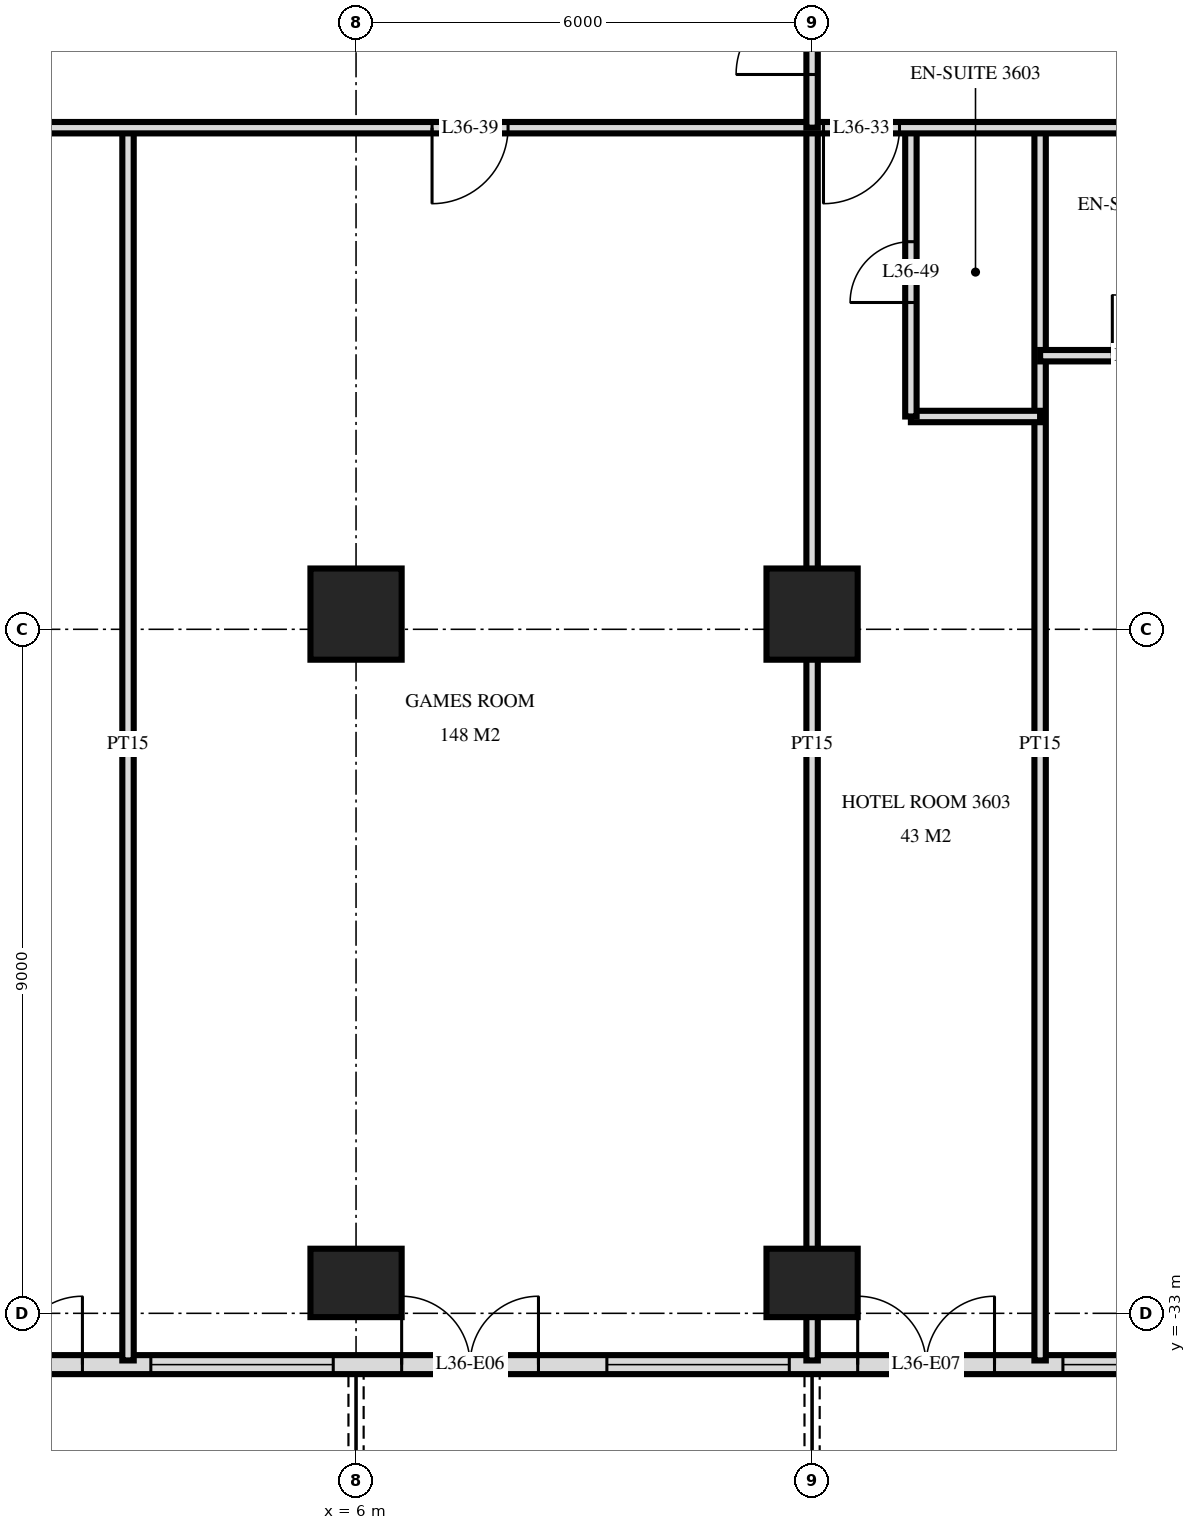
"""IFC4 building model, lengths in metres.
Left out: names, types, materials, properties, quantities, classifications, styles, units other than length and angle.
Written with IfcOpenShell. Run it as: python <this file> out.ifc"""

import sys

from ifc_helpers import new_model, si_unit, direction, frame, frame_2d, origin, origin_2d, place, context, subcontext, project, spatial, rectangle, extrude, element, fill, save


model = new_model("IFC4")
c1 = context("Model", 3, precision=1e-05, world=origin(), true_north=direction((0.0, 1.0)))
c2 = subcontext(c1, "Body", "Model", "MODEL_VIEW")
j1 = project(units=[si_unit("LENGTHUNIT", "METRE"), si_unit("PLANEANGLEUNIT", "RADIAN")], contexts=[c1])
p1 = place(None, origin())
s1 = spatial("IfcSite", under=j1, at=p1, CompositionType="ELEMENT")
p2 = place(p1, origin())
s2 = spatial("IfcBuilding", under=s1, at=p2, CompositionType="ELEMENT")
p3 = place(p2, frame((0.0, 0.0, 141.6)))
s3 = spatial("IfcBuildingStorey", under=s2, at=p3, CompositionType="ELEMENT", Elevation=141.6)
p4 = place(p3, frame((6.0, -32.6, 0.0), z_axis=(0.0, 0.0, 1.0), x_axis=(1.0, 0.0, 0.0)))
e1 = element("IfcColumn", 1, at=p4, inside=s3, PredefinedType="COLUMN", context=c2, shape_type="SweptSolid", body=[
    extrude(rectangle(XDim=1.2, YDim=0.9, at=origin_2d()), origin(), (0.0, 0.0, 1.0), 3.6),
])
p5 = place(p3, frame((6.0, -23.8, 0.0), z_axis=(0.0, 0.0, 1.0), x_axis=(1.0, 0.0, 0.0)))
e2 = element("IfcColumn", 2, at=p5, inside=s3, PredefinedType="COLUMN", context=c2, shape_type="SweptSolid", body=[
    extrude(rectangle(XDim=1.2, YDim=1.2, at=origin_2d()), origin(), (0.0, 0.0, 1.0), 3.6),
])
p6 = place(p3, frame((12.0, -32.6, 0.0), z_axis=(0.0, 0.0, 1.0), x_axis=(1.0, 0.0, 0.0)))
e3 = element("IfcColumn", 3, at=p6, inside=s3, PredefinedType="COLUMN", context=c2, shape_type="SweptSolid", body=[
    extrude(rectangle(XDim=1.2, YDim=0.9, at=origin_2d()), origin(), (0.0, 0.0, 1.0), 3.6),
])
p7 = place(p3, frame((12.0, -23.8, 0.0), z_axis=(0.0, 0.0, 1.0), x_axis=(1.0, 0.0, 0.0)))
e4 = element("IfcColumn", 4, at=p7, inside=s3, PredefinedType="COLUMN", context=c2, shape_type="SweptSolid", body=[
    extrude(rectangle(XDim=1.2, YDim=1.2, at=origin_2d()), origin(), (0.0, 0.0, 1.0), 3.6),
])
p8 = place(p3, frame((-23.675, -33.675, 0.0), z_axis=(0.0, 0.0, 1.0), x_axis=(1.0, 0.0, 0.0)))
e5 = element("IfcWall", 5, at=p8, inside=s3, PredefinedType="SOLIDWALL", context=c2, shape_type="SweptSolid", body=[
    extrude(rectangle(XDim=47.351, YDim=0.25, at=frame_2d((23.675, 0.0))), origin(), (0.0, 0.0, 1.0), 3.32),
])
p9 = place(p8, frame((0.575, 0.0, 0.0)))
e6 = element("IfcOpeningElement", 6, at=p9, cuts=e5, PredefinedType="OPENING", context=c2, shape_type="SweptSolid", body=[
    extrude(rectangle(XDim=1.8, YDim=2.4, at=frame_2d((0.9, 1.2))), frame((0.0, 0.135, 0.0), z_axis=(0.0, -1.0, 0.0), x_axis=(1.0, 0.0, 0.0)), (0.0, 0.0, 1.0), 0.27),
])
p10 = place(p8, frame((3.425, 0.0, 0.3)))
e7 = element("IfcOpeningElement", 7, at=p10, cuts=e5, PredefinedType="OPENING", context=c2, shape_type="SweptSolid", body=[
    extrude(rectangle(XDim=1.8, YDim=2.1, at=frame_2d((0.9, 1.05))), frame((0.0, 0.135, 0.0), z_axis=(0.0, -1.0, 0.0), x_axis=(1.0, 0.0, 0.0)), (0.0, 0.0, 1.0), 0.27),
])
p11 = place(p8, frame((5.975, 0.0, 0.3)))
e8 = element("IfcOpeningElement", 8, at=p11, cuts=e5, PredefinedType="OPENING", context=c2, shape_type="SweptSolid", body=[
    extrude(rectangle(XDim=2.4, YDim=2.1, at=frame_2d((1.2, 1.05))), frame((0.0, 0.135, 0.0), z_axis=(0.0, -1.0, 0.0), x_axis=(1.0, 0.0, 0.0)), (0.0, 0.0, 1.0), 0.27),
])
p12 = place(p8, frame((9.275, 0.0, 0.0)))
e9 = element("IfcOpeningElement", 9, at=p12, cuts=e5, PredefinedType="OPENING", context=c2, shape_type="SweptSolid", body=[
    extrude(rectangle(XDim=1.8, YDim=2.4, at=frame_2d((0.9, 1.2))), frame((0.0, 0.135, 0.0), z_axis=(0.0, -1.0, 0.0), x_axis=(1.0, 0.0, 0.0)), (0.0, 0.0, 1.0), 0.27),
])
p13 = place(p8, frame((12.275, 0.0, 0.0)))
e10 = element("IfcOpeningElement", 10, at=p13, cuts=e5, PredefinedType="OPENING", context=c2, shape_type="SweptSolid", body=[
    extrude(rectangle(XDim=1.8, YDim=2.4, at=frame_2d((0.9, 1.2))), frame((0.0, 0.135, 0.0), z_axis=(0.0, -1.0, 0.0), x_axis=(1.0, 0.0, 0.0)), (0.0, 0.0, 1.0), 0.27),
])
p14 = place(p8, frame((14.975, 0.0, 0.3)))
e11 = element("IfcOpeningElement", 11, at=p14, cuts=e5, PredefinedType="OPENING", context=c2, shape_type="SweptSolid", body=[
    extrude(rectangle(XDim=2.4, YDim=2.1, at=frame_2d((1.2, 1.05))), frame((0.0, 0.135, 0.0), z_axis=(0.0, -1.0, 0.0), x_axis=(1.0, 0.0, 0.0)), (0.0, 0.0, 1.0), 0.27),
])
p15 = place(p8, frame((17.975, 0.0, 0.3)))
e12 = element("IfcOpeningElement", 12, at=p15, cuts=e5, PredefinedType="OPENING", context=c2, shape_type="SweptSolid", body=[
    extrude(rectangle(XDim=2.4, YDim=2.1, at=frame_2d((1.2, 1.05))), frame((0.0, 0.135, 0.0), z_axis=(0.0, -1.0, 0.0), x_axis=(1.0, 0.0, 0.0)), (0.0, 0.0, 1.0), 0.27),
])
p16 = place(p8, frame((21.275, 0.0, 0.0)))
e13 = element("IfcOpeningElement", 13, at=p16, cuts=e5, PredefinedType="OPENING", context=c2, shape_type="SweptSolid", body=[
    extrude(rectangle(XDim=1.8, YDim=2.4, at=frame_2d((0.9, 1.2))), frame((0.0, 0.135, 0.0), z_axis=(0.0, -1.0, 0.0), x_axis=(1.0, 0.0, 0.0)), (0.0, 0.0, 1.0), 0.27),
])
p17 = place(p8, frame((24.275, 0.0, 0.0)))
e14 = element("IfcOpeningElement", 14, at=p17, cuts=e5, PredefinedType="OPENING", context=c2, shape_type="SweptSolid", body=[
    extrude(rectangle(XDim=1.8, YDim=2.4, at=frame_2d((0.9, 1.2))), frame((0.0, 0.135, 0.0), z_axis=(0.0, -1.0, 0.0), x_axis=(1.0, 0.0, 0.0)), (0.0, 0.0, 1.0), 0.27),
])
p18 = place(p8, frame((26.975, 0.0, 0.3)))
e15 = element("IfcOpeningElement", 15, at=p18, cuts=e5, PredefinedType="OPENING", context=c2, shape_type="SweptSolid", body=[
    extrude(rectangle(XDim=2.4, YDim=2.1, at=frame_2d((1.2, 1.05))), frame((0.0, 0.135, 0.0), z_axis=(0.0, -1.0, 0.0), x_axis=(1.0, 0.0, 0.0)), (0.0, 0.0, 1.0), 0.27),
])
p19 = place(p8, frame((30.275, 0.0, 0.0)))
e16 = element("IfcOpeningElement", 16, at=p19, cuts=e5, PredefinedType="OPENING", context=c2, shape_type="SweptSolid", body=[
    extrude(rectangle(XDim=1.8, YDim=2.4, at=frame_2d((0.9, 1.2))), frame((0.0, 0.135, 0.0), z_axis=(0.0, -1.0, 0.0), x_axis=(1.0, 0.0, 0.0)), (0.0, 0.0, 1.0), 0.27),
])
p20 = place(p8, frame((32.975, 0.0, 0.3)))
e17 = element("IfcOpeningElement", 17, at=p20, cuts=e5, PredefinedType="OPENING", context=c2, shape_type="SweptSolid", body=[
    extrude(rectangle(XDim=2.4, YDim=2.1, at=frame_2d((1.2, 1.05))), frame((0.0, 0.135, 0.0), z_axis=(0.0, -1.0, 0.0), x_axis=(1.0, 0.0, 0.0)), (0.0, 0.0, 1.0), 0.27),
])
p21 = place(p8, frame((36.275, 0.0, 0.0)))
e18 = element("IfcOpeningElement", 18, at=p21, cuts=e5, PredefinedType="OPENING", context=c2, shape_type="SweptSolid", body=[
    extrude(rectangle(XDim=1.8, YDim=2.4, at=frame_2d((0.9, 1.2))), frame((0.0, 0.135, 0.0), z_axis=(0.0, -1.0, 0.0), x_axis=(1.0, 0.0, 0.0)), (0.0, 0.0, 1.0), 0.27),
])
p22 = place(p8, frame((38.975, 0.0, 0.3)))
e19 = element("IfcOpeningElement", 19, at=p22, cuts=e5, PredefinedType="OPENING", context=c2, shape_type="SweptSolid", body=[
    extrude(rectangle(XDim=2.4, YDim=2.1, at=frame_2d((1.2, 1.05))), frame((0.0, 0.135, 0.0), z_axis=(0.0, -1.0, 0.0), x_axis=(1.0, 0.0, 0.0)), (0.0, 0.0, 1.0), 0.27),
])
p23 = place(p8, frame((42.275, 0.0, 0.0)))
e20 = element("IfcOpeningElement", 20, at=p23, cuts=e5, PredefinedType="OPENING", context=c2, shape_type="SweptSolid", body=[
    extrude(rectangle(XDim=1.8, YDim=2.4, at=frame_2d((0.9, 1.2))), frame((0.0, 0.135, 0.0), z_axis=(0.0, -1.0, 0.0), x_axis=(1.0, 0.0, 0.0)), (0.0, 0.0, 1.0), 0.27),
])
p24 = place(p8, frame((45.125, 0.0, 0.3)))
e21 = element("IfcOpeningElement", 21, at=p24, cuts=e5, PredefinedType="OPENING", context=c2, shape_type="SweptSolid", body=[
    extrude(rectangle(XDim=1.8, YDim=2.1, at=frame_2d((0.9, 1.05))), frame((0.0, 0.135, 0.0), z_axis=(0.0, -1.0, 0.0), x_axis=(1.0, 0.0, 0.0)), (0.0, 0.0, 1.0), 0.27),
])
p25 = place(p3, frame((15.0, -33.62, 0.0), z_axis=(0.0, 0.0, 1.0), x_axis=(0.0, 1.0, 0.0)))
e22 = element("IfcWall", 22, at=p25, inside=s3, PredefinedType="PARTITIONING", context=c2, shape_type="SweptSolid", body=[
    extrude(rectangle(XDim=16.22, YDim=0.15, at=frame_2d((8.11, 0.0))), origin(), (0.0, 0.0, 1.0), 3.32),
])
p26 = place(p3, frame((13.3, -21.2, 0.0), z_axis=(0.0, 0.0, 1.0), x_axis=(0.0, 1.0, 0.0)))
e23 = element("IfcWall", 23, at=p26, inside=s3, PredefinedType="PARTITIONING", context=c2, shape_type="SweptSolid", body=[
    extrude(rectangle(XDim=3.8, YDim=0.15, at=frame_2d((1.9, 0.0))), origin(), (0.0, 0.0, 1.0), 3.32),
])
p27 = place(p26, frame((1.5, 0.0, 0.0)))
e24 = element("IfcOpeningElement", 24, at=p27, cuts=e23, PredefinedType="OPENING", context=c2, shape_type="SweptSolid", body=[
    extrude(rectangle(XDim=0.8, YDim=2.1, at=frame_2d((0.4, 1.05))), frame((0.0, 0.085, 0.0), z_axis=(0.0, -1.0, 0.0), x_axis=(1.0, 0.0, 0.0)), (0.0, 0.0, 1.0), 0.17),
])
p28 = place(p3, frame((12.0, -17.4, 0.0), z_axis=(0.0, 0.0, 1.0), x_axis=(0.0, 1.0, 0.0)))
e25 = element("IfcWall", 25, at=p28, inside=s3, PredefinedType="PARTITIONING", context=c2, shape_type="SweptSolid", body=[
    extrude(rectangle(XDim=2.35, YDim=0.15, at=frame_2d((1.175, 0.0))), origin(), (0.0, 0.0, 1.0), 3.32),
])
p29 = place(p28, frame((0.7, 0.0, 0.0)))
e26 = element("IfcOpeningElement", 26, at=p29, cuts=e25, PredefinedType="OPENING", context=c2, shape_type="SweptSolid", body=[
    extrude(rectangle(XDim=1.0, YDim=2.1, at=frame_2d((0.5, 1.05))), frame((0.0, 0.085, 0.0), z_axis=(0.0, -1.0, 0.0), x_axis=(1.0, 0.0, 0.0)), (0.0, 0.0, 1.0), 0.17),
])
for number, where, z_axis, x_axis in (
    (27, (12.0, -33.62, 0.0), (0.0, 0.0, 1.0), (0.0, 1.0, 0.0)),
    (28, (3.0, -33.62, 0.0), (0.0, 0.0, 1.0), (0.0, 1.0, 0.0)),
):
    element("IfcWall", number, at=place(p3, frame(where, z_axis=z_axis, x_axis=x_axis)), inside=s3, PredefinedType="PARTITIONING", context=c2, shape_type="SweptSolid", body=[
        extrude(rectangle(XDim=16.22, YDim=0.15, at=frame_2d((8.11, 0.0))), origin(), (0.0, 0.0, 1.0), 3.32),
    ])
p30 = place(p3, frame((13.3, -21.2, 0.0), z_axis=(0.0, 0.0, 1.0), x_axis=(1.0, 0.0, 0.0)))
e29 = element("IfcWall", 29, at=p30, inside=s3, PredefinedType="PARTITIONING", context=c2, shape_type="SweptSolid", body=[
    extrude(rectangle(XDim=1.7, YDim=0.15, at=frame_2d((0.85, 0.0))), origin(), (0.0, 0.0, 1.0), 3.32),
])
p31 = place(p3, frame((15.0, -20.4, 0.0), z_axis=(0.0, 0.0, 1.0), x_axis=(1.0, 0.0, 0.0)))
e30 = element("IfcWall", 30, at=p31, inside=s3, PredefinedType="PARTITIONING", context=c2, shape_type="SweptSolid", body=[
    extrude(rectangle(XDim=4.2, YDim=0.15, at=frame_2d((2.1, 0.0))), origin(), (0.0, 0.0, 1.0), 3.32),
])
p32 = place(p31, frame((0.95, 0.0, 0.0)))
e31 = element("IfcOpeningElement", 31, at=p32, cuts=e30, PredefinedType="OPENING", context=c2, shape_type="SweptSolid", body=[
    extrude(rectangle(XDim=0.8, YDim=2.1, at=frame_2d((0.4, 1.05))), frame((0.0, 0.085, 0.0), z_axis=(0.0, -1.0, 0.0), x_axis=(1.0, 0.0, 0.0)), (0.0, 0.0, 1.0), 0.17),
])
p33 = place(p3, frame((-28.02, -17.4, 0.0), z_axis=(0.0, 0.0, 1.0), x_axis=(1.0, 0.0, 0.0)))
e32 = element("IfcWall", 32, at=p33, inside=s3, PredefinedType="PARTITIONING", context=c2, shape_type="SweptSolid", body=[
    extrude(rectangle(XDim=56.04, YDim=0.15, at=frame_2d((28.02, 0.0))), origin(), (0.0, 0.0, 1.0), 3.32),
])
p34 = place(p33, frame((13.17, 0.0, 0.0)))
e33 = element("IfcOpeningElement", 33, at=p34, cuts=e32, PredefinedType="OPENING", context=c2, shape_type="SweptSolid", body=[
    extrude(rectangle(XDim=1.0, YDim=2.1, at=frame_2d((0.5, 1.05))), frame((0.0, 0.085, 0.0), z_axis=(0.0, -1.0, 0.0), x_axis=(1.0, 0.0, 0.0)), (0.0, 0.0, 1.0), 0.17),
])
p35 = place(p33, frame((11.87, 0.0, 0.0)))
e34 = element("IfcOpeningElement", 34, at=p35, cuts=e32, PredefinedType="OPENING", context=c2, shape_type="SweptSolid", body=[
    extrude(rectangle(XDim=1.0, YDim=2.1, at=frame_2d((0.5, 1.05))), frame((0.0, 0.085, 0.0), z_axis=(0.0, -1.0, 0.0), x_axis=(1.0, 0.0, 0.0)), (0.0, 0.0, 1.0), 0.17),
])
p36 = place(p33, frame((2.32, 0.0, 0.0)))
e35 = element("IfcOpeningElement", 35, at=p36, cuts=e32, PredefinedType="OPENING", context=c2, shape_type="SweptSolid", body=[
    extrude(rectangle(XDim=1.0, YDim=2.1, at=frame_2d((0.5, 1.05))), frame((0.0, 0.085, 0.0), z_axis=(0.0, -1.0, 0.0), x_axis=(1.0, 0.0, 0.0)), (0.0, 0.0, 1.0), 0.17),
])
p37 = place(p33, frame((40.17, 0.0, 0.0)))
e36 = element("IfcOpeningElement", 36, at=p37, cuts=e32, PredefinedType="OPENING", context=c2, shape_type="SweptSolid", body=[
    extrude(rectangle(XDim=1.0, YDim=2.1, at=frame_2d((0.5, 1.05))), frame((0.0, 0.085, 0.0), z_axis=(0.0, -1.0, 0.0), x_axis=(1.0, 0.0, 0.0)), (0.0, 0.0, 1.0), 0.17),
])
p38 = place(p33, frame((51.22, 0.0, 0.0)))
e37 = element("IfcOpeningElement", 37, at=p38, cuts=e32, PredefinedType="OPENING", context=c2, shape_type="SweptSolid", body=[
    extrude(rectangle(XDim=1.0, YDim=2.1, at=frame_2d((0.5, 1.05))), frame((0.0, 0.085, 0.0), z_axis=(0.0, -1.0, 0.0), x_axis=(1.0, 0.0, 0.0)), (0.0, 0.0, 1.0), 0.17),
])
p39 = place(p33, frame((18.52, 0.0, 0.0)))
e38 = element("IfcOpeningElement", 38, at=p39, cuts=e32, PredefinedType="OPENING", context=c2, shape_type="SweptSolid", body=[
    extrude(rectangle(XDim=1.0, YDim=2.1, at=frame_2d((0.5, 1.05))), frame((0.0, 0.085, 0.0), z_axis=(0.0, -1.0, 0.0), x_axis=(1.0, 0.0, 0.0)), (0.0, 0.0, 1.0), 0.17),
])
p40 = place(p33, frame((26.02, 0.0, 0.0)))
e39 = element("IfcOpeningElement", 39, at=p40, cuts=e32, PredefinedType="OPENING", context=c2, shape_type="SweptSolid", body=[
    extrude(rectangle(XDim=1.0, YDim=2.1, at=frame_2d((0.5, 1.05))), frame((0.0, 0.085, 0.0), z_axis=(0.0, -1.0, 0.0), x_axis=(1.0, 0.0, 0.0)), (0.0, 0.0, 1.0), 0.17),
])
p41 = place(p33, frame((35.02, 0.0, 0.0)))
e40 = element("IfcOpeningElement", 40, at=p41, cuts=e32, PredefinedType="OPENING", context=c2, shape_type="SweptSolid", body=[
    extrude(rectangle(XDim=1.0, YDim=2.1, at=frame_2d((0.5, 1.05))), frame((0.0, 0.085, 0.0), z_axis=(0.0, -1.0, 0.0), x_axis=(1.0, 0.0, 0.0)), (0.0, 0.0, 1.0), 0.17),
])
p42 = place(p17, origin())
e41 = element("IfcDoor", 41, at=p42, inside=s3, OperationType="DOUBLE_DOOR_SINGLE_SWING", PredefinedType="DOOR", context=c2, shape_type="SweptSolid", body=[
    extrude(rectangle(XDim=1.8, YDim=2.4, at=frame_2d((0.9, 1.2))), frame((0.0, 0.025, 0.0), z_axis=(0.0, -1.0, 0.0), x_axis=(1.0, 0.0, 0.0)), (0.0, 0.0, 1.0), 0.05),
])
fill(e14, e41)
p43 = place(p18, origin())
e42 = element("IfcWindow", 42, at=p43, inside=s3, PartitioningType="SINGLE_PANEL", PredefinedType="WINDOW", context=c2, shape_type="SweptSolid", body=[
    extrude(rectangle(XDim=2.4, YDim=2.1, at=frame_2d((1.2, 1.05))), frame((0.0, 0.03, 0.0), z_axis=(0.0, -1.0, 0.0), x_axis=(1.0, 0.0, 0.0)), (0.0, 0.0, 1.0), 0.06),
])
fill(e15, e42)
p44 = place(p19, origin())
e43 = element("IfcDoor", 43, at=p44, inside=s3, OperationType="DOUBLE_DOOR_SINGLE_SWING", PredefinedType="DOOR", context=c2, shape_type="SweptSolid", body=[
    extrude(rectangle(XDim=1.8, YDim=2.4, at=frame_2d((0.9, 1.2))), frame((0.0, 0.025, 0.0), z_axis=(0.0, -1.0, 0.0), x_axis=(1.0, 0.0, 0.0)), (0.0, 0.0, 1.0), 0.05),
])
fill(e16, e43)
p45 = place(p20, origin())
e44 = element("IfcWindow", 44, at=p45, inside=s3, PartitioningType="SINGLE_PANEL", PredefinedType="WINDOW", context=c2, shape_type="SweptSolid", body=[
    extrude(rectangle(XDim=2.4, YDim=2.1, at=frame_2d((1.2, 1.05))), frame((0.0, 0.03, 0.0), z_axis=(0.0, -1.0, 0.0), x_axis=(1.0, 0.0, 0.0)), (0.0, 0.0, 1.0), 0.06),
])
fill(e17, e44)
p46 = place(p21, origin())
e45 = element("IfcDoor", 45, at=p46, inside=s3, OperationType="DOUBLE_DOOR_SINGLE_SWING", PredefinedType="DOOR", context=c2, shape_type="SweptSolid", body=[
    extrude(rectangle(XDim=1.8, YDim=2.4, at=frame_2d((0.9, 1.2))), frame((0.0, 0.025, 0.0), z_axis=(0.0, -1.0, 0.0), x_axis=(1.0, 0.0, 0.0)), (0.0, 0.0, 1.0), 0.05),
])
fill(e18, e45)
p47 = place(p22, origin())
e46 = element("IfcWindow", 46, at=p47, inside=s3, PartitioningType="SINGLE_PANEL", PredefinedType="WINDOW", context=c2, shape_type="SweptSolid", body=[
    extrude(rectangle(XDim=2.4, YDim=2.1, at=frame_2d((1.2, 1.05))), frame((0.0, 0.03, 0.0), z_axis=(0.0, -1.0, 0.0), x_axis=(1.0, 0.0, 0.0)), (0.0, 0.0, 1.0), 0.06),
])
fill(e19, e46)
p48 = place(p29, origin())
e47 = element("IfcDoor", 47, at=p48, inside=s3, OperationType="SINGLE_SWING_RIGHT", PredefinedType="DOOR", context=c2, shape_type="SweptSolid", body=[
    extrude(rectangle(XDim=1.0, YDim=2.1, at=frame_2d((0.5, 1.05))), frame((0.0, 0.025, 0.0), z_axis=(0.0, -1.0, 0.0), x_axis=(1.0, 0.0, 0.0)), (0.0, 0.0, 1.0), 0.05),
])
fill(e26, e47)
p49 = place(p37, frame((0.5, 0.0, 0.0), z_axis=(0.0, 0.0, 1.0), x_axis=(-1.0, 0.0, 0.0)))
e48 = element("IfcDoor", 48, at=p49, inside=s3, OperationType="SINGLE_SWING_LEFT", PredefinedType="DOOR", context=c2, shape_type="SweptSolid", body=[
    extrude(rectangle(XDim=1.0, YDim=2.1, at=frame_2d((0.0, 1.05))), frame((0.0, -0.025, 0.0), z_axis=(0.0, 1.0, 0.0), x_axis=(-1.0, 0.0, 0.0)), (0.0, 0.0, 1.0), 0.05),
])
fill(e36, e48)
p50 = place(p41, frame((0.5, 0.0, 0.0), z_axis=(0.0, 0.0, 1.0), x_axis=(-1.0, 0.0, 0.0)))
e49 = element("IfcDoor", 49, at=p50, inside=s3, OperationType="SINGLE_SWING_LEFT", PredefinedType="DOOR", context=c2, shape_type="SweptSolid", body=[
    extrude(rectangle(XDim=1.0, YDim=2.1, at=frame_2d((0.0, 1.05))), frame((0.0, -0.025, 0.0), z_axis=(0.0, 1.0, 0.0), x_axis=(-1.0, 0.0, 0.0)), (0.0, 0.0, 1.0), 0.05),
])
fill(e40, e49)
p51 = place(p27, origin())
e50 = element("IfcDoor", 50, at=p51, inside=s3, OperationType="SINGLE_SWING_RIGHT", PredefinedType="DOOR", context=c2, shape_type="SweptSolid", body=[
    extrude(rectangle(XDim=0.8, YDim=2.1, at=frame_2d((0.4, 1.05))), frame((0.0, 0.025, 0.0), z_axis=(0.0, -1.0, 0.0), x_axis=(1.0, 0.0, 0.0)), (0.0, 0.0, 1.0), 0.05),
])
fill(e24, e50)
p52 = place(p32, origin())
e51 = element("IfcDoor", 51, at=p52, inside=s3, OperationType="SINGLE_SWING_RIGHT", PredefinedType="DOOR", context=c2, shape_type="SweptSolid", body=[
    extrude(rectangle(XDim=0.8, YDim=2.1, at=frame_2d((0.4, 1.05))), frame((0.0, 0.025, 0.0), z_axis=(0.0, -1.0, 0.0), x_axis=(1.0, 0.0, 0.0)), (0.0, 0.0, 1.0), 0.05),
])
fill(e31, e51)
save(model, sys.argv[1])
